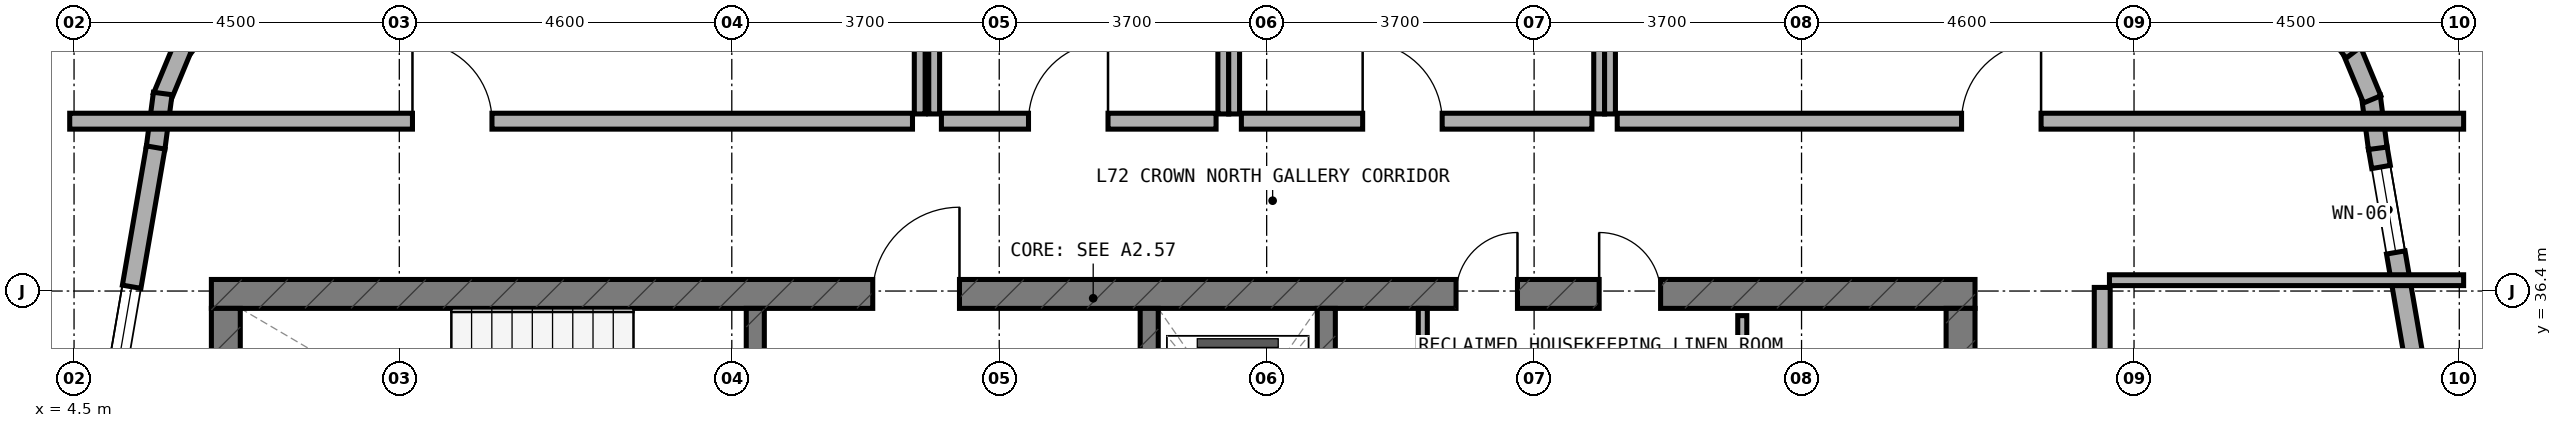
"""IFC4 building model, lengths in metres.
Left out: names, types, materials, properties, quantities, classifications, styles, units other than length and angle.
Written with IfcOpenShell. Run it as: python <this file> out.ifc"""

import sys

from ifc_helpers import new_model, si_unit, direction, frame, frame_2d, origin, place, context, subcontext, project, spatial, rectangle, extrude, element, fill, save


model = new_model("IFC4")
c1 = context("Model", 3, precision=1e-05, world=origin(), true_north=direction((0.0, 1.0)))
c2 = subcontext(c1, "Body", "Model", "MODEL_VIEW")
j1 = project(units=[si_unit("LENGTHUNIT", "METRE"), si_unit("PLANEANGLEUNIT", "RADIAN")], contexts=[c1])
p1 = place(None, origin())
s1 = spatial("IfcSite", under=j1, at=p1, CompositionType="ELEMENT")
p2 = place(p1, origin())
s2 = spatial("IfcBuilding", under=s1, at=p2, CompositionType="ELEMENT")
p3 = place(p2, frame((0.0, 0.0, 264.8)))
s3 = spatial("IfcBuildingStorey", under=s2, at=p3, CompositionType="ELEMENT", Elevation=264.8)
p4 = place(p3, frame((6.4, 36.36, 0.0), z_axis=(0.0, 0.0, 1.0), x_axis=(1.0, 0.0, 0.0)))
e1 = element("IfcWall", 1, at=p4, inside=s3, PredefinedType="SHEAR", context=c2, shape_type="SweptSolid", body=[
    extrude(rectangle(XDim=24.4, YDim=0.4, at=frame_2d((12.2, 0.0))), origin(), (0.0, 0.0, 1.0), 3.6),
])
p5 = place(p4, frame((9.15, 0.0, 0.0)))
e2 = element("IfcOpeningElement", 2, at=p5, cuts=e1, PredefinedType="OPENING", context=c2, shape_type="SweptSolid", body=[
    extrude(rectangle(XDim=1.2, YDim=2.15, at=frame_2d((0.6, 1.075))), frame((0.0, 0.21, 0.0), z_axis=(0.0, -1.0, 0.0), x_axis=(1.0, 0.0, 0.0)), (0.0, 0.0, 1.0), 0.42),
])
p6 = place(p4, frame((19.2, 0.0, 0.0)))
e3 = element("IfcOpeningElement", 3, at=p6, cuts=e1, PredefinedType="OPENING", context=c2, shape_type="SweptSolid", body=[
    extrude(rectangle(XDim=0.85, YDim=2.1, at=frame_2d((0.425, 1.05))), frame((0.0, 0.21, 0.0), z_axis=(0.0, -1.0, 0.0), x_axis=(1.0, 0.0, 0.0)), (0.0, 0.0, 1.0), 0.42),
])
p7 = place(p4, frame((17.22, 0.0, 0.0)))
e4 = element("IfcOpeningElement", 4, at=p7, cuts=e1, PredefinedType="OPENING", context=c2, shape_type="SweptSolid", body=[
    extrude(rectangle(XDim=0.85, YDim=2.1, at=frame_2d((0.425, 1.05))), frame((0.0, 0.21, 0.0), z_axis=(0.0, -1.0, 0.0), x_axis=(1.0, 0.0, 0.0)), (0.0, 0.0, 1.0), 0.42),
])
for number, where, z_axis, x_axis in (
    (5, (6.6, 33.0, 0.0), (0.0, 0.0, 1.0), (0.0, 1.0, 0.0)),
    (6, (30.6, 33.0, 0.0), (0.0, 0.0, 1.0), (0.0, 1.0, 0.0)),
):
    element("IfcWall", number, at=place(p3, frame(where, z_axis=z_axis, x_axis=x_axis)), inside=s3, PredefinedType="SHEAR", context=c2, shape_type="SweptSolid", body=[
        extrude(rectangle(XDim=3.16, YDim=0.4, at=frame_2d((1.58, 0.0))), origin(), (0.0, 0.0, 1.0), 3.6),
    ])
p8 = place(p3, frame((13.925, 33.0, 0.0), z_axis=(0.0, 0.0, 1.0), x_axis=(0.0, 1.0, 0.0)))
e7 = element("IfcWall", 7, at=p8, inside=s3, PredefinedType="STANDARD", context=c2, shape_type="SweptSolid", body=[
    extrude(rectangle(XDim=3.16, YDim=0.25, at=frame_2d((1.58, 0.0))), origin(), (0.0, 0.0, 1.0), 3.32),
])
p9 = place(p8, frame((0.98, 0.0, 0.0)))
e8 = element("IfcOpeningElement", 8, at=p9, cuts=e7, PredefinedType="OPENING", context=c2, shape_type="SweptSolid", body=[
    extrude(rectangle(XDim=1.1, YDim=2.15, at=frame_2d((0.55, 1.075))), frame((0.0, 0.135, 0.0), z_axis=(0.0, -1.0, 0.0), x_axis=(1.0, 0.0, 0.0)), (0.0, 0.0, 1.0), 0.27),
])
p10 = place(p3, frame((19.375, 33.0, 0.0), z_axis=(0.0, 0.0, 1.0), x_axis=(0.0, 1.0, 0.0)))
e9 = element("IfcWall", 9, at=p10, inside=s3, PredefinedType="STANDARD", context=c2, shape_type="SweptSolid", body=[
    extrude(rectangle(XDim=3.16, YDim=0.25, at=frame_2d((1.58, 0.0))), origin(), (0.0, 0.0, 1.0), 3.32),
])
p11 = place(p10, frame((0.98, 0.0, 0.0)))
e10 = element("IfcOpeningElement", 10, at=p11, cuts=e9, PredefinedType="OPENING", context=c2, shape_type="SweptSolid", body=[
    extrude(rectangle(XDim=1.1, YDim=2.15, at=frame_2d((0.55, 1.075))), frame((0.0, 0.135, 0.0), z_axis=(0.0, -1.0, 0.0), x_axis=(1.0, 0.0, 0.0)), (0.0, 0.0, 1.0), 0.27),
])
p12 = place(p3, frame((21.825, 33.0, 0.0), z_axis=(0.0, 0.0, 1.0), x_axis=(0.0, 1.0, 0.0)))
e11 = element("IfcWall", 11, at=p12, inside=s3, PredefinedType="STANDARD", context=c2, shape_type="SweptSolid", body=[
    extrude(rectangle(XDim=3.16, YDim=0.25, at=frame_2d((1.58, 0.0))), origin(), (0.0, 0.0, 1.0), 3.32),
])
p13 = place(p3, frame((37.781, 30.204, 0.0), z_axis=(0.0, 0.0, 1.0), x_axis=(-0.169818291056, 0.985475391891, 0.0)))
e12 = element("IfcWall", 12, at=p13, inside=s3, PredefinedType="STANDARD", context=c2, shape_type="SweptSolid", body=[
    extrude(rectangle(XDim=8.302, YDim=0.26, at=frame_2d((4.151, 0.0))), origin(), (0.0, 0.0, 1.0), 3.32),
])
p14 = place(p13, frame((2.112, 0.0, 0.85)))
e13 = element("IfcOpeningElement", 13, at=p14, cuts=e12, PredefinedType="OPENING", context=c2, shape_type="SweptSolid", body=[
    extrude(rectangle(XDim=2.1, YDim=1.5, at=frame_2d((1.05, 0.75))), frame((0.0, 0.14, 0.0), z_axis=(0.0, -1.0, 0.0), x_axis=(1.0, 0.0, 0.0)), (0.0, 0.0, 1.0), 0.28),
])
p15 = place(p13, frame((6.829, 0.0, 0.5)))
e14 = element("IfcOpeningElement", 14, at=p15, cuts=e12, PredefinedType="OPENING", context=c2, shape_type="SweptSolid", body=[
    extrude(rectangle(XDim=1.2, YDim=1.9, at=frame_2d((0.6, 0.95))), frame((0.0, 0.14, 0.0), z_axis=(0.0, -1.0, 0.0), x_axis=(1.0, 0.0, 0.0)), (0.0, 0.0, 1.0), 0.28),
])
p16 = place(p3, frame((36.372, 38.375, 0.0), z_axis=(0.0, 0.0, 1.0), x_axis=(-0.130255288807, 0.991480488834, 0.0)))
e15 = element("IfcWall", 15, at=p16, inside=s3, PredefinedType="STANDARD", context=c2, shape_type="SweptSolid", body=[
    extrude(rectangle(XDim=0.729, YDim=0.26, at=frame_2d((0.365, 0.0))), origin(), (0.0, 0.0, 1.0), 3.32),
])
p17 = place(p3, frame((36.295, 39.052, 0.0), z_axis=(0.0, 0.0, 1.0), x_axis=(-0.383267045233, 0.923637576129, 0.0)))
e16 = element("IfcWall", 16, at=p17, inside=s3, PredefinedType="STANDARD", context=c2, shape_type="SweptSolid", body=[
    extrude(rectangle(XDim=0.746, YDim=0.26, at=frame_2d((0.373, 0.0))), origin(), (0.0, 0.0, 1.0), 3.32),
])
for number, where, z_axis, x_axis in (
    (17, (36.037, 39.701, 0.0), (0.0, 0.0, 1.0), (-0.609, 0.793, 0.0)),
    (18, (6.438, 40.321, 0.0), (0.0, 0.0, 1.0), (-0.609, -0.793, 0.0)),
):
    element("IfcWall", number, at=place(p3, frame(where, z_axis=z_axis, x_axis=x_axis)), inside=s3, PredefinedType="STANDARD", context=c2, shape_type="SweptSolid", body=[
        extrude(rectangle(XDim=0.746, YDim=0.26, at=frame_2d((0.373, 0.0))), origin(), (0.0, 0.0, 1.0), 3.32),
    ])
p18 = place(p3, frame((6.005, 39.773, 0.0), z_axis=(0.0, 0.0, 1.0), x_axis=(-0.383267045233, -0.923637576129, 0.0)))
e19 = element("IfcWall", 19, at=p18, inside=s3, PredefinedType="STANDARD", context=c2, shape_type="SweptSolid", body=[
    extrude(rectangle(XDim=0.746, YDim=0.26, at=frame_2d((0.373, 0.0))), origin(), (0.0, 0.0, 1.0), 3.32),
])
p19 = place(p3, frame((5.727, 39.133, 0.0), z_axis=(0.0, 0.0, 1.0), x_axis=(-0.129653178221, -0.991559404866, 0.0)))
e20 = element("IfcWall", 20, at=p19, inside=s3, PredefinedType="STANDARD", context=c2, shape_type="SweptSolid", body=[
    extrude(rectangle(XDim=0.764, YDim=0.26, at=frame_2d((0.382, 0.0))), origin(), (0.0, 0.0, 1.0), 3.32),
])
p20 = place(p3, frame((5.629, 38.386, 0.0), z_axis=(0.0, 0.0, 1.0), x_axis=(-0.169818291056, -0.985475391891, 0.0)))
e21 = element("IfcWall", 21, at=p20, inside=s3, PredefinedType="STANDARD", context=c2, shape_type="SweptSolid", body=[
    extrude(rectangle(XDim=8.302, YDim=0.26, at=frame_2d((4.151, 0.0))), origin(), (0.0, 0.0, 1.0), 3.32),
])
p21 = place(p20, frame((1.955, 0.0, 0.85)))
e22 = element("IfcOpeningElement", 22, at=p21, cuts=e21, PredefinedType="OPENING", context=c2, shape_type="SweptSolid", body=[
    extrude(rectangle(XDim=2.1, YDim=1.5, at=frame_2d((1.05, 0.75))), frame((0.0, 0.14, 0.0), z_axis=(0.0, -1.0, 0.0), x_axis=(1.0, 0.0, 0.0)), (0.0, 0.0, 1.0), 0.28),
])
p22 = place(p20, frame((6.515, 0.0, 0.85)))
e23 = element("IfcOpeningElement", 23, at=p22, cuts=e21, PredefinedType="OPENING", context=c2, shape_type="SweptSolid", body=[
    extrude(rectangle(XDim=1.5, YDim=1.5, at=frame_2d((0.75, 0.75))), frame((0.0, 0.14, 0.0), z_axis=(0.0, -1.0, 0.0), x_axis=(1.0, 0.0, 0.0)), (0.0, 0.0, 1.0), 0.28),
])
p23 = place(p3, frame((27.58, 33.1, 0.0), z_axis=(0.0, 0.0, 1.0), x_axis=(0.0, 1.0, 0.0)))
e24 = element("IfcWall", 24, at=p23, inside=s3, PredefinedType="PARTITIONING", context=c2, shape_type="SweptSolid", body=[
    extrude(rectangle(XDim=2.96, YDim=0.125, at=frame_2d((1.48, 0.0))), origin(), (0.0, 0.0, 1.0), 3.32),
])
p24 = place(p23, frame((1.055, 0.0, 0.0)))
e25 = element("IfcOpeningElement", 25, at=p24, cuts=e24, PredefinedType="OPENING", context=c2, shape_type="SweptSolid", body=[
    extrude(rectangle(XDim=0.85, YDim=2.1, at=frame_2d((0.425, 1.05))), frame((0.0, 0.073, 0.0), z_axis=(0.0, -1.0, 0.0), x_axis=(1.0, 0.0, 0.0)), (0.0, 0.0, 1.0), 0.145),
])
p25 = place(p3, frame((23.16, 34.82, 0.0), z_axis=(0.0, 0.0, 1.0), x_axis=(0.0, 1.0, 0.0)))
e26 = element("IfcWall", 26, at=p25, inside=s3, PredefinedType="PARTITIONING", context=c2, shape_type="SweptSolid", body=[
    extrude(rectangle(XDim=1.34, YDim=0.125, at=frame_2d((0.67, 0.0))), origin(), (0.0, 0.0, 1.0), 3.32),
])
p26 = place(p3, frame((32.66, 36.55, 0.0), z_axis=(0.0, 0.0, 1.0), x_axis=(1.0, 0.0, 0.0)))
e27 = element("IfcWall", 27, at=p26, inside=s3, PredefinedType="PARTITIONING", context=c2, shape_type="SweptSolid", body=[
    extrude(rectangle(XDim=4.9, YDim=0.15, at=frame_2d((2.45, 0.0))), origin(), (0.0, 0.0, 1.0), 2.795),
])
p27 = place(p3, frame((32.56, 13.55, 0.0), z_axis=(0.0, 0.0, 1.0), x_axis=(0.0, 1.0, 0.0)))
e28 = element("IfcWall", 28, at=p27, inside=s3, PredefinedType="SOLIDWALL", context=c2, shape_type="SweptSolid", body=[
    extrude(rectangle(XDim=22.9, YDim=0.22, at=frame_2d((11.45, 0.0))), origin(), (0.0, 0.0, 1.0), 2.795),
])
p28 = place(p27, frame((9.8, 0.0, 0.0)))
e29 = element("IfcOpeningElement", 29, at=p28, cuts=e28, PredefinedType="OPENING", context=c2, shape_type="SweptSolid", body=[
    extrude(rectangle(XDim=1.1, YDim=2.1, at=frame_2d((0.55, 1.05))), frame((0.0, 0.12, 0.0), z_axis=(0.0, -1.0, 0.0), x_axis=(1.0, 0.0, 0.0)), (0.0, 0.0, 1.0), 0.24),
])
for number, where, z_axis, x_axis in (
    (30, (16.4, 38.85, 0.0), (0.0, 0.0, 1.0), (0.0, 1.0, 0.0)),
    (31, (20.4, 38.85, 0.0), (0.0, 0.0, 1.0), (0.0, 1.0, 0.0)),
):
    element("IfcWall", number, at=place(p3, frame(where, z_axis=z_axis, x_axis=x_axis)), inside=s3, PredefinedType="PARTITIONING", context=c2, shape_type="SweptSolid", body=[
        extrude(rectangle(XDim=3.41, YDim=0.15, at=frame_2d((1.705, 0.0))), origin(), (0.0, 0.0, 1.0), 3.015),
    ])
p29 = place(p3, frame((16.5, 38.75, 0.0), z_axis=(0.0, 0.0, 1.0), x_axis=(1.0, 0.0, 0.0)))
e32 = element("IfcWall", 32, at=p29, inside=s3, PredefinedType="SOLIDWALL", context=c2, shape_type="SweptSolid", body=[
    extrude(rectangle(XDim=3.8, YDim=0.22, at=frame_2d((1.9, 0.0))), origin(), (0.0, 0.0, 1.0), 2.965),
])
p30 = place(p29, frame((1.205, 0.0, 0.0)))
e33 = element("IfcOpeningElement", 33, at=p30, cuts=e32, PredefinedType="OPENING", context=c2, shape_type="SweptSolid", body=[
    extrude(rectangle(XDim=1.1, YDim=2.1, at=frame_2d((0.55, 1.05))), frame((0.0, 0.12, 0.0), z_axis=(0.0, -1.0, 0.0), x_axis=(1.0, 0.0, 0.0)), (0.0, 0.0, 1.0), 0.24),
])
for number, where, z_axis, x_axis in (
    (34, (20.55, 38.85, 0.0), (0.0, 0.0, 1.0), (0.0, 1.0, 0.0)),
    (35, (25.6, 38.85, 0.0), (0.0, 0.0, 1.0), (0.0, 1.0, 0.0)),
):
    element("IfcWall", number, at=place(p3, frame(where, z_axis=z_axis, x_axis=x_axis)), inside=s3, PredefinedType="PARTITIONING", context=c2, shape_type="SweptSolid", body=[
        extrude(rectangle(XDim=3.41, YDim=0.15, at=frame_2d((1.705, 0.0))), origin(), (0.0, 0.0, 1.0), 3.015),
    ])
p31 = place(p3, frame((20.65, 38.75, 0.0), z_axis=(0.0, 0.0, 1.0), x_axis=(1.0, 0.0, 0.0)))
e36 = element("IfcWall", 36, at=p31, inside=s3, PredefinedType="SOLIDWALL", context=c2, shape_type="SweptSolid", body=[
    extrude(rectangle(XDim=4.85, YDim=0.22, at=frame_2d((2.425, 0.0))), origin(), (0.0, 0.0, 1.0), 2.965),
])
p32 = place(p31, frame((1.678, 0.0, 0.0)))
e37 = element("IfcOpeningElement", 37, at=p32, cuts=e36, PredefinedType="OPENING", context=c2, shape_type="SweptSolid", body=[
    extrude(rectangle(XDim=1.1, YDim=2.1, at=frame_2d((0.55, 1.05))), frame((0.0, 0.12, 0.0), z_axis=(0.0, -1.0, 0.0), x_axis=(1.0, 0.0, 0.0)), (0.0, 0.0, 1.0), 0.24),
])
p33 = place(p3, frame((25.75, 38.85, 0.0), z_axis=(0.0, 0.0, 1.0), x_axis=(0.0, 1.0, 0.0)))
e38 = element("IfcWall", 38, at=p33, inside=s3, PredefinedType="PARTITIONING", context=c2, shape_type="SweptSolid", body=[
    extrude(rectangle(XDim=3.41, YDim=0.15, at=frame_2d((1.705, 0.0))), origin(), (0.0, 0.0, 1.0), 2.795),
])
p34 = place(p3, frame((25.85, 38.75, 0.0), z_axis=(0.0, 0.0, 1.0), x_axis=(1.0, 0.0, 0.0)))
e39 = element("IfcWall", 39, at=p34, inside=s3, PredefinedType="SOLIDWALL", context=c2, shape_type="SweptSolid", body=[
    extrude(rectangle(XDim=11.71, YDim=0.22, at=frame_2d((5.855, 0.0))), origin(), (0.0, 0.0, 1.0), 2.795),
])
p35 = place(p34, frame((4.764, 0.0, 0.0)))
e40 = element("IfcOpeningElement", 40, at=p35, cuts=e39, PredefinedType="OPENING", context=c2, shape_type="SweptSolid", body=[
    extrude(rectangle(XDim=1.1, YDim=2.1, at=frame_2d((0.55, 1.05))), frame((0.0, 0.12, 0.0), z_axis=(0.0, -1.0, 0.0), x_axis=(1.0, 0.0, 0.0)), (0.0, 0.0, 1.0), 0.24),
])
p36 = place(p3, frame((16.2, 38.85, 0.0), z_axis=(0.0, 0.0, 1.0), x_axis=(0.0, 1.0, 0.0)))
e41 = element("IfcWall", 41, at=p36, inside=s3, PredefinedType="PARTITIONING", context=c2, shape_type="SweptSolid", body=[
    extrude(rectangle(XDim=3.41, YDim=0.15, at=frame_2d((1.705, 0.0))), origin(), (0.0, 0.0, 1.0), 2.795),
])
p37 = place(p3, frame((4.44, 38.75, 0.0), z_axis=(0.0, 0.0, 1.0), x_axis=(1.0, 0.0, 0.0)))
e42 = element("IfcWall", 42, at=p37, inside=s3, PredefinedType="SOLIDWALL", context=c2, shape_type="SweptSolid", body=[
    extrude(rectangle(XDim=11.66, YDim=0.22, at=frame_2d((5.83, 0.0))), origin(), (0.0, 0.0, 1.0), 2.795),
])
p38 = place(p37, frame((4.742, 0.0, 0.0)))
e43 = element("IfcOpeningElement", 43, at=p38, cuts=e42, PredefinedType="OPENING", context=c2, shape_type="SweptSolid", body=[
    extrude(rectangle(XDim=1.1, YDim=2.1, at=frame_2d((0.55, 1.05))), frame((0.0, 0.12, 0.0), z_axis=(0.0, -1.0, 0.0), x_axis=(1.0, 0.0, 0.0)), (0.0, 0.0, 1.0), 0.24),
])
p39 = place(p15, origin())
e44 = element("IfcWindow", 44, at=p39, inside=s3, PartitioningType="SINGLE_PANEL", PredefinedType="WINDOW", context=c2, shape_type="SweptSolid", body=[
    extrude(rectangle(XDim=1.2, YDim=1.9, at=frame_2d((0.6, 0.95))), frame((0.0, 0.03, 0.0), z_axis=(0.0, -1.0, 0.0), x_axis=(1.0, 0.0, 0.0)), (0.0, 0.0, 1.0), 0.06),
])
fill(e14, e44)
p40 = place(p21, origin())
e45 = element("IfcWindow", 45, at=p40, inside=s3, PartitioningType="SINGLE_PANEL", PredefinedType="WINDOW", context=c2, shape_type="SweptSolid", body=[
    extrude(rectangle(XDim=2.1, YDim=1.5, at=frame_2d((1.05, 0.75))), frame((0.0, 0.03, 0.0), z_axis=(0.0, -1.0, 0.0), x_axis=(1.0, 0.0, 0.0)), (0.0, 0.0, 1.0), 0.06),
])
fill(e22, e45)
p41 = place(p5, origin())
e46 = element("IfcDoor", 46, at=p41, inside=s3, OperationType="SINGLE_SWING_RIGHT", PredefinedType="DOOR", context=c2, shape_type="SweptSolid", body=[
    extrude(rectangle(XDim=1.2, YDim=2.15, at=frame_2d((0.6, 1.075))), frame((0.0, 0.025, 0.0), z_axis=(0.0, -1.0, 0.0), x_axis=(1.0, 0.0, 0.0)), (0.0, 0.0, 1.0), 0.05),
])
fill(e2, e46)
p42 = place(p6, origin())
e47 = element("IfcDoor", 47, at=p42, inside=s3, OperationType="SINGLE_SWING_LEFT", PredefinedType="DOOR", context=c2, shape_type="SweptSolid", body=[
    extrude(rectangle(XDim=0.85, YDim=2.1, at=frame_2d((0.425, 1.05))), frame((0.0, 0.025, 0.0), z_axis=(0.0, -1.0, 0.0), x_axis=(1.0, 0.0, 0.0)), (0.0, 0.0, 1.0), 0.05),
])
fill(e3, e47)
p43 = place(p7, origin())
e48 = element("IfcDoor", 48, at=p43, inside=s3, OperationType="SINGLE_SWING_RIGHT", PredefinedType="DOOR", context=c2, shape_type="SweptSolid", body=[
    extrude(rectangle(XDim=0.85, YDim=2.1, at=frame_2d((0.425, 1.05))), frame((0.0, 0.025, 0.0), z_axis=(0.0, -1.0, 0.0), x_axis=(1.0, 0.0, 0.0)), (0.0, 0.0, 1.0), 0.05),
])
fill(e4, e48)
p44 = place(p30, origin())
e49 = element("IfcDoor", 49, at=p44, inside=s3, OperationType="SINGLE_SWING_RIGHT", PredefinedType="DOOR", context=c2, shape_type="SweptSolid", body=[
    extrude(rectangle(XDim=1.1, YDim=2.1, at=frame_2d((0.55, 1.05))), frame((0.0, 0.025, 0.0), z_axis=(0.0, -1.0, 0.0), x_axis=(1.0, 0.0, 0.0)), (0.0, 0.0, 1.0), 0.05),
])
fill(e33, e49)
p45 = place(p32, origin())
e50 = element("IfcDoor", 50, at=p45, inside=s3, OperationType="SINGLE_SWING_LEFT", PredefinedType="DOOR", context=c2, shape_type="SweptSolid", body=[
    extrude(rectangle(XDim=1.1, YDim=2.1, at=frame_2d((0.55, 1.05))), frame((0.0, 0.025, 0.0), z_axis=(0.0, -1.0, 0.0), x_axis=(1.0, 0.0, 0.0)), (0.0, 0.0, 1.0), 0.05),
])
fill(e37, e50)
p46 = place(p35, origin())
e51 = element("IfcDoor", 51, at=p46, inside=s3, OperationType="SINGLE_SWING_RIGHT", PredefinedType="DOOR", context=c2, shape_type="SweptSolid", body=[
    extrude(rectangle(XDim=1.1, YDim=2.1, at=frame_2d((0.55, 1.05))), frame((0.0, 0.025, 0.0), z_axis=(0.0, -1.0, 0.0), x_axis=(1.0, 0.0, 0.0)), (0.0, 0.0, 1.0), 0.05),
])
fill(e40, e51)
p47 = place(p38, origin())
e52 = element("IfcDoor", 52, at=p47, inside=s3, OperationType="SINGLE_SWING_LEFT", PredefinedType="DOOR", context=c2, shape_type="SweptSolid", body=[
    extrude(rectangle(XDim=1.1, YDim=2.1, at=frame_2d((0.55, 1.05))), frame((0.0, 0.025, 0.0), z_axis=(0.0, -1.0, 0.0), x_axis=(1.0, 0.0, 0.0)), (0.0, 0.0, 1.0), 0.05),
])
fill(e43, e52)
save(model, sys.argv[1])
